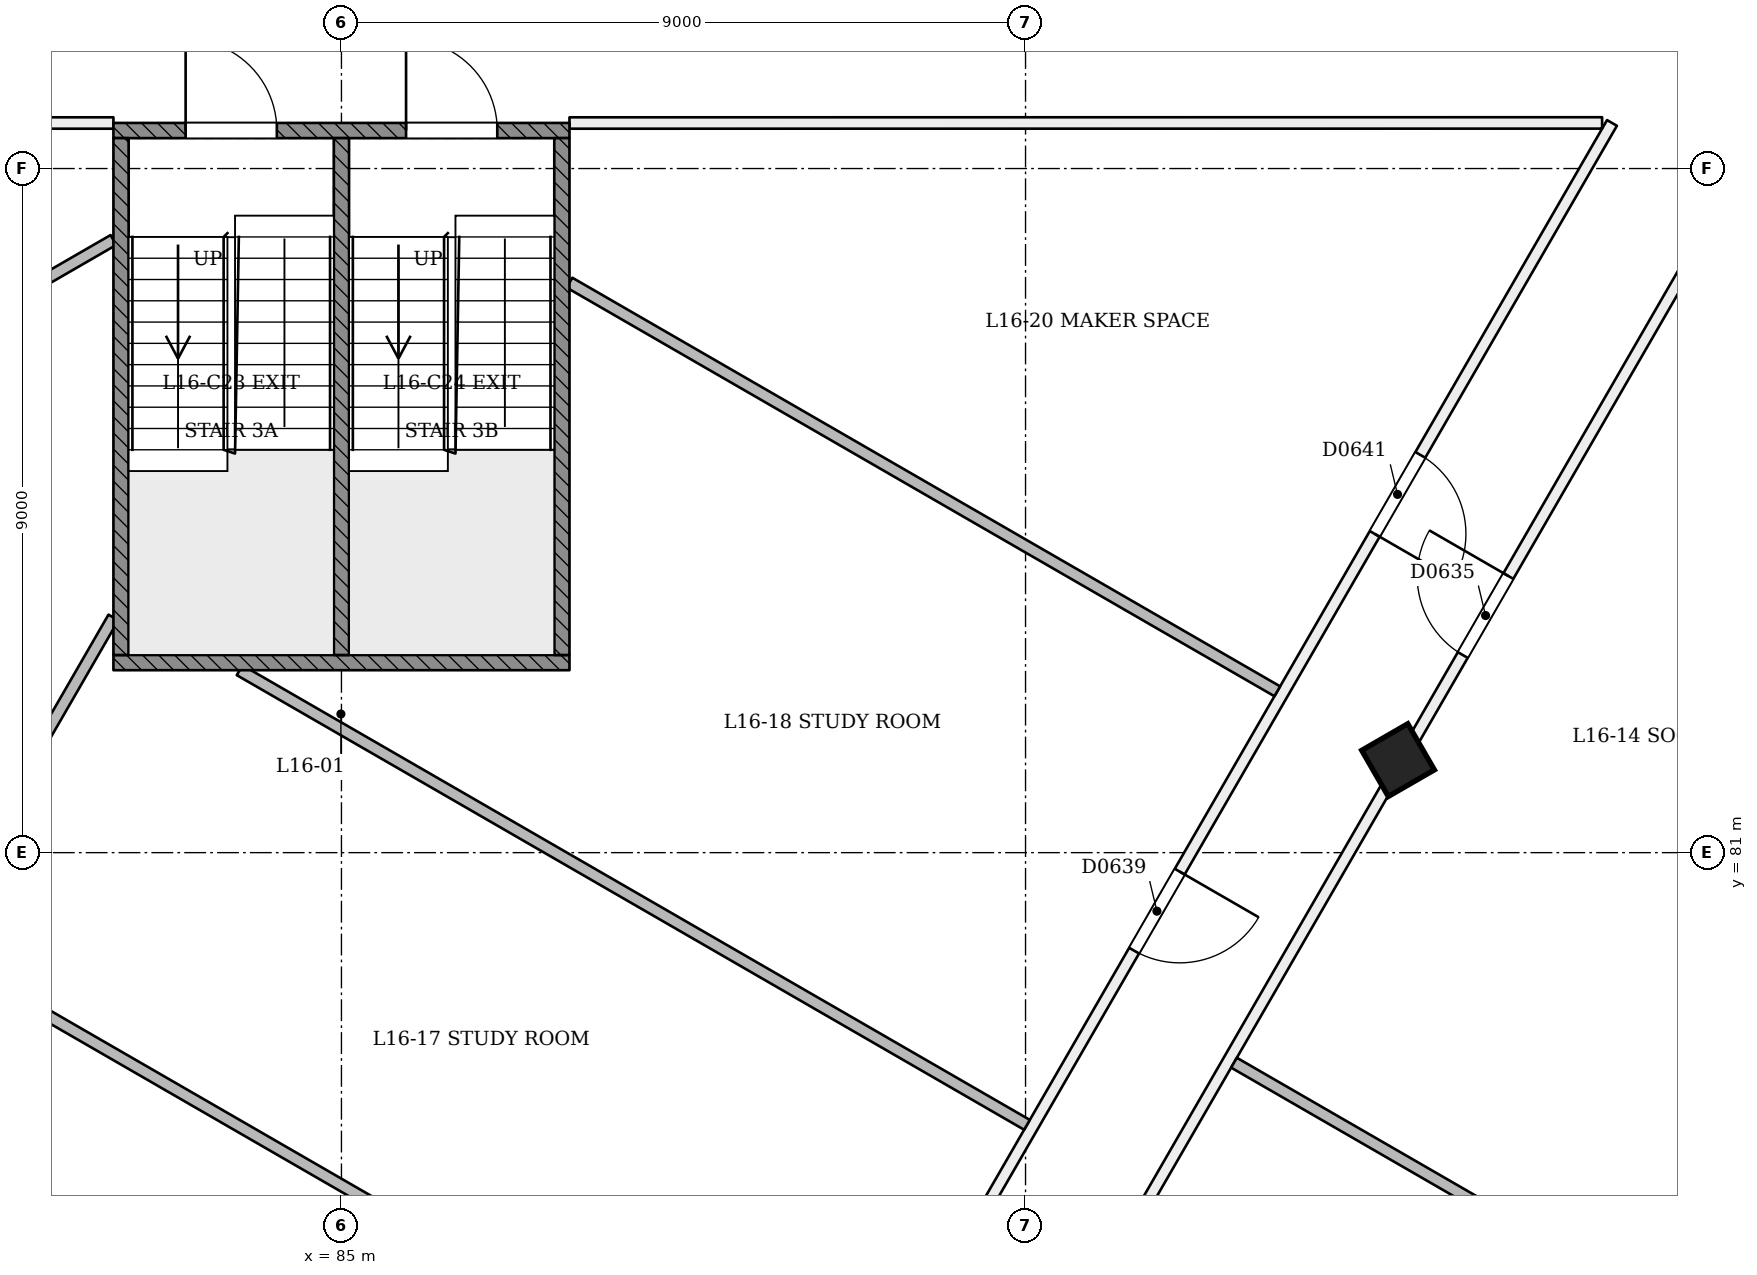
"""IFC4 building model, lengths in metres.
Left out: names, types, materials, properties, quantities, classifications, styles, units other than length and angle.
Written with IfcOpenShell. Run it as: python <this file> out.ifc"""

import sys

from ifc_helpers import new_model, si_unit, direction, frame, frame_2d, origin, origin_2d, place, context, subcontext, project, spatial, rectangle, extrude, element, fill, save


model = new_model("IFC4")
c1 = context("Model", 3, precision=1e-05, world=origin(), true_north=direction((0.0, 1.0)))
c2 = subcontext(c1, "Body", "Model", "MODEL_VIEW")
j1 = project(units=[si_unit("LENGTHUNIT", "METRE"), si_unit("PLANEANGLEUNIT", "RADIAN")], contexts=[c1])
p1 = place(None, origin())
s1 = spatial("IfcSite", under=j1, at=p1, CompositionType="ELEMENT")
p2 = place(p1, origin())
s2 = spatial("IfcBuilding", under=s1, at=p2, CompositionType="ELEMENT")
p3 = place(p2, frame((0.0, 0.0, 66.6)))
s3 = spatial("IfcBuildingStorey", under=s2, at=p3, CompositionType="ELEMENT", Elevation=66.6)
p4 = place(p3, frame((98.928, 82.17, -0.021), z_axis=(-0.022222910879, 0.038415824599, 0.999014697916), x_axis=(-0.499505628395, -0.866026390086, 0.022190513195)))
e1 = element("IfcColumn", 1, at=p4, inside=s3, PredefinedType="COLUMN", context=c2, shape_type="SweptSolid", body=[
    extrude(rectangle(XDim=0.7, YDim=0.7, at=origin_2d()), origin(), (0.0, 0.0, 1.0), 3.604),
])
p5 = place(p3, frame((62.458, 97.093, 0.0), z_axis=(0.0, 0.0, 1.0), x_axis=(0.499998802074, -0.866026095406, 0.0)))
e2 = element("IfcWall", 2, at=p5, inside=s3, PredefinedType="PARTITIONING", context=c2, shape_type="SweptSolid", body=[
    extrude(rectangle(XDim=43.437, YDim=0.15, at=frame_2d((21.719, 0.0))), origin(), (0.0, 0.0, 1.0), 2.7),
])
p6 = place(p5, frame((0.286, 0.0, 0.0)))
e3 = element("IfcOpeningElement", 3, at=p6, cuts=e2, PredefinedType="OPENING", context=c2, shape_type="SweptSolid", body=[
    extrude(rectangle(XDim=1.2, YDim=2.1, at=frame_2d((0.6, 1.05))), frame((0.0, 0.085, 0.0), z_axis=(0.0, -1.0, 0.0), x_axis=(1.0, 0.0, 0.0)), (0.0, 0.0, 1.0), 0.171),
])
p7 = place(p5, frame((12.13, 0.0, 0.0)))
e4 = element("IfcOpeningElement", 4, at=p7, cuts=e2, PredefinedType="OPENING", context=c2, shape_type="SweptSolid", body=[
    extrude(rectangle(XDim=1.2, YDim=2.1, at=frame_2d((0.6, 1.05))), frame((0.0, 0.085, 0.0), z_axis=(0.0, -1.0, 0.0), x_axis=(1.0, 0.0, 0.0)), (0.0, 0.0, 1.0), 0.171),
])
p8 = place(p5, frame((18.98, 0.0, 0.0)))
e5 = element("IfcOpeningElement", 5, at=p8, cuts=e2, PredefinedType="OPENING", context=c2, shape_type="SweptSolid", body=[
    extrude(rectangle(XDim=1.0, YDim=2.1, at=frame_2d((0.5, 1.05))), frame((0.0, 0.085, 0.0), z_axis=(0.0, -1.0, 0.0), x_axis=(1.0, 0.0, 0.0)), (0.0, 0.0, 1.0), 0.171),
])
p9 = place(p5, frame((27.88, 0.0, 0.0)))
e6 = element("IfcOpeningElement", 6, at=p9, cuts=e2, PredefinedType="OPENING", context=c2, shape_type="SweptSolid", body=[
    extrude(rectangle(XDim=1.2, YDim=2.1, at=frame_2d((0.6, 1.05))), frame((0.0, 0.085, 0.0), z_axis=(0.0, -1.0, 0.0), x_axis=(1.0, 0.0, 0.0)), (0.0, 0.0, 1.0), 0.171),
])
p10 = place(p5, frame((38.745, 0.0, 0.0)))
e7 = element("IfcOpeningElement", 7, at=p10, cuts=e2, PredefinedType="OPENING", context=c2, shape_type="SweptSolid", body=[
    extrude(rectangle(XDim=1.2, YDim=2.1, at=frame_2d((0.6, 1.05))), frame((0.0, 0.085, 0.0), z_axis=(0.0, -1.0, 0.0), x_axis=(1.0, 0.0, 0.0)), (0.0, 0.0, 1.0), 0.171),
])
p11 = place(p3, frame((85.824, 59.475, 0.0), z_axis=(0.0, 0.0, 1.0), x_axis=(0.499998498473, 0.86602627069, 0.0)))
e8 = element("IfcWall", 8, at=p11, inside=s3, PredefinedType="PARTITIONING", context=c2, shape_type="SweptSolid", body=[
    extrude(rectangle(XDim=42.924, YDim=0.15, at=frame_2d((21.462, 0.0))), origin(), (0.0, 0.0, 1.0), 2.7),
])
p12 = place(p11, frame((3.492, 0.0, 0.0)))
e9 = element("IfcOpeningElement", 9, at=p12, cuts=e8, PredefinedType="OPENING", context=c2, shape_type="SweptSolid", body=[
    extrude(rectangle(XDim=1.2, YDim=2.1, at=frame_2d((0.6, 1.05))), frame((0.0, 0.085, 0.0), z_axis=(0.0, -1.0, 0.0), x_axis=(1.0, 0.0, 0.0)), (0.0, 0.0, 1.0), 0.171),
])
p13 = place(p11, frame((14.357, 0.0, 0.0)))
e10 = element("IfcOpeningElement", 10, at=p13, cuts=e8, PredefinedType="OPENING", context=c2, shape_type="SweptSolid", body=[
    extrude(rectangle(XDim=1.2, YDim=2.1, at=frame_2d((0.6, 1.05))), frame((0.0, 0.085, 0.0), z_axis=(0.0, -1.0, 0.0), x_axis=(1.0, 0.0, 0.0)), (0.0, 0.0, 1.0), 0.171),
])
p14 = place(p11, frame((27.857, 0.0, 0.0)))
e11 = element("IfcOpeningElement", 11, at=p14, cuts=e8, PredefinedType="OPENING", context=c2, shape_type="SweptSolid", body=[
    extrude(rectangle(XDim=1.2, YDim=2.1, at=frame_2d((0.6, 1.05))), frame((0.0, 0.085, 0.0), z_axis=(0.0, -1.0, 0.0), x_axis=(1.0, 0.0, 0.0)), (0.0, 0.0, 1.0), 0.171),
])
p15 = place(p11, frame((38.721, 0.0, 0.0)))
e12 = element("IfcOpeningElement", 12, at=p15, cuts=e8, PredefinedType="OPENING", context=c2, shape_type="SweptSolid", body=[
    extrude(rectangle(XDim=1.2, YDim=2.1, at=frame_2d((0.6, 1.05))), frame((0.0, 0.085, 0.0), z_axis=(0.0, -1.0, 0.0), x_axis=(1.0, 0.0, 0.0)), (0.0, 0.0, 1.0), 0.171),
])
p16 = place(p3, frame((101.715, 90.6, 0.0), z_axis=(0.0, 0.0, 1.0), x_axis=(-0.499996397115, -0.866027483901, 0.0)))
e13 = element("IfcWall", 13, at=p16, inside=s3, PredefinedType="PARTITIONING", context=c2, shape_type="SweptSolid", body=[
    extrude(rectangle(XDim=33.301, YDim=0.15, at=frame_2d((16.65, 0.0))), origin(), (0.0, 0.0, 1.0), 3.1),
])
p17 = place(p16, frame((17.288, 0.0, 0.0)))
e14 = element("IfcOpeningElement", 14, at=p17, cuts=e13, PredefinedType="OPENING", context=c2, shape_type="SweptSolid", body=[
    extrude(rectangle(XDim=1.2, YDim=2.1, at=frame_2d((0.6, 1.05))), frame((0.0, 0.085, 0.0), z_axis=(0.0, -1.0, 0.0), x_axis=(1.0, 0.0, 0.0)), (0.0, 0.0, 1.0), 0.171),
])
p18 = place(p16, frame((11.374, 0.0, 0.0)))
e15 = element("IfcOpeningElement", 15, at=p18, cuts=e13, PredefinedType="OPENING", context=c2, shape_type="SweptSolid", body=[
    extrude(rectangle(XDim=1.2, YDim=2.1, at=frame_2d((0.6, 1.05))), frame((0.0, 0.085, 0.0), z_axis=(0.0, -1.0, 0.0), x_axis=(1.0, 0.0, 0.0)), (0.0, 0.0, 1.0), 0.171),
])
p19 = place(p16, frame((5.043, 0.0, 0.0)))
e16 = element("IfcOpeningElement", 16, at=p19, cuts=e13, PredefinedType="OPENING", context=c2, shape_type="SweptSolid", body=[
    extrude(rectangle(XDim=1.2, YDim=2.1, at=frame_2d((0.6, 1.05))), frame((0.0, 0.085, 0.0), z_axis=(0.0, -1.0, 0.0), x_axis=(1.0, 0.0, 0.0)), (0.0, 0.0, 1.0), 0.171),
])
p20 = place(p3, frame((85.0, 61.648, 0.0), z_axis=(0.0, 0.0, 1.0), x_axis=(-0.499995543135, 0.866027976941, 0.0)))
e17 = element("IfcWall", 17, at=p20, inside=s3, PredefinedType="PARTITIONING", context=c2, shape_type="SweptSolid", body=[
    extrude(rectangle(XDim=33.431, YDim=0.15, at=frame_2d((16.715, 0.0))), origin(), (0.0, 0.0, 1.0), 3.1),
])
p21 = place(p20, frame((5.719, 0.0, 0.0)))
e18 = element("IfcOpeningElement", 18, at=p21, cuts=e17, PredefinedType="OPENING", context=c2, shape_type="SweptSolid", body=[
    extrude(rectangle(XDim=1.2, YDim=2.1, at=frame_2d((0.6, 1.05))), frame((0.0, 0.085, 0.0), z_axis=(0.0, -1.0, 0.0), x_axis=(1.0, 0.0, 0.0)), (0.0, 0.0, 1.0), 0.171),
])
p22 = place(p20, frame((21.269, 0.0, 0.0)))
e19 = element("IfcOpeningElement", 19, at=p22, cuts=e17, PredefinedType="OPENING", context=c2, shape_type="SweptSolid", body=[
    extrude(rectangle(XDim=1.2, YDim=2.1, at=frame_2d((0.6, 1.05))), frame((0.0, 0.085, 0.0), z_axis=(0.0, -1.0, 0.0), x_axis=(1.0, 0.0, 0.0)), (0.0, 0.0, 1.0), 0.171),
])
p23 = place(p20, frame((27.454, 0.0, 0.0)))
e20 = element("IfcOpeningElement", 20, at=p23, cuts=e17, PredefinedType="OPENING", context=c2, shape_type="SweptSolid", body=[
    extrude(rectangle(XDim=1.2, YDim=2.1, at=frame_2d((0.6, 1.05))), frame((0.0, 0.085, 0.0), z_axis=(0.0, -1.0, 0.0), x_axis=(1.0, 0.0, 0.0)), (0.0, 0.0, 1.0), 0.171),
])
p24 = place(p20, frame((12.513, 0.0, 0.0)))
e21 = element("IfcOpeningElement", 21, at=p24, cuts=e17, PredefinedType="OPENING", context=c2, shape_type="SweptSolid", body=[
    extrude(rectangle(XDim=1.2, YDim=2.1, at=frame_2d((0.6, 1.05))), frame((0.0, 0.085, 0.0), z_axis=(0.0, -1.0, 0.0), x_axis=(1.0, 0.0, 0.0)), (0.0, 0.0, 1.0), 0.171),
])
for number, where, z_axis, x_axis in (
    (22, (88.0, 90.599, 0.0), (0.0, 0.0, 1.0), (1.0, 7.188e-05, 0.0)),
    (23, (68.415, 90.6, 0.0), (0.0, 0.0, 1.0), (1.0, -7.188e-05, 0.0)),
):
    element("IfcWall", number, at=place(p3, frame(where, z_axis=z_axis, x_axis=x_axis)), inside=s3, PredefinedType="PARTITIONING", context=c2, shape_type="SweptSolid", body=[
        extrude(rectangle(XDim=13.585, YDim=0.15, at=frame_2d((6.793, 0.0))), origin(), (0.0, 0.0, 1.0), 3.1),
    ])
p25 = place(p3, frame((102.22, 75.074, 0.0), z_axis=(0.0, 0.0, 1.0), x_axis=(-0.866015887322, 0.500016482634, 0.0)))
e24 = element("IfcWall", 24, at=p25, inside=s3, PredefinedType="PARTITIONING", context=c2, shape_type="SweptSolid", body=[
    extrude(rectangle(XDim=6.325, YDim=0.15, at=frame_2d((3.163, 0.0))), origin(), (0.0, 0.0, 1.0), 2.6),
])
p26 = place(p3, frame((94.019, 77.419, 0.0), z_axis=(0.0, 0.0, 1.0), x_axis=(-0.866025155626, 0.500000429823, 0.0)))
e25 = element("IfcWall", 25, at=p26, inside=s3, PredefinedType="PARTITIONING", context=c2, shape_type="SweptSolid", body=[
    extrude(rectangle(XDim=11.961, YDim=0.15, at=frame_2d((5.981, 0.0))), origin(), (0.0, 0.0, 1.0), 3.1),
])
p27 = place(p3, frame((82.0, 84.094, 0.0), z_axis=(0.0, 0.0, 1.0), x_axis=(-0.500007457698, -0.866021098038, 0.0)))
e26 = element("IfcWall", 26, at=p27, inside=s3, PredefinedType="PARTITIONING", context=c2, shape_type="SweptSolid", body=[
    extrude(rectangle(XDim=4.894, YDim=0.15, at=frame_2d((2.447, 0.0))), origin(), (0.0, 0.0, 1.0), 3.1),
])
p28 = place(p3, frame((79.515, 79.791, 0.0), z_axis=(0.0, 0.0, 1.0), x_axis=(0.866020625573, -0.500008276014, 0.0)))
e27 = element("IfcWall", 27, at=p28, inside=s3, PredefinedType="PARTITIONING", context=c2, shape_type="SweptSolid", body=[
    extrude(rectangle(XDim=7.295, YDim=0.15, at=frame_2d((3.648, 0.0))), origin(), (0.0, 0.0, 1.0), 3.1),
])
p29 = place(p3, frame((97.312, 83.123, 0.0), z_axis=(0.0, 0.0, 1.0), x_axis=(-0.866022617577, 0.500004825822, 0.0)))
e28 = element("IfcWall", 28, at=p29, inside=s3, PredefinedType="PARTITIONING", context=c2, shape_type="SweptSolid", body=[
    extrude(rectangle(XDim=10.752, YDim=0.15, at=frame_2d((5.376, 0.0))), origin(), (0.0, 0.0, 1.0), 3.1),
])
p30 = place(p3, frame((82.0, 89.06, 0.0), z_axis=(0.0, 0.0, 1.0), x_axis=(-0.866027129831, -0.499997010388, 0.0)))
e29 = element("IfcWall", 29, at=p30, inside=s3, PredefinedType="PARTITIONING", context=c2, shape_type="SweptSolid", body=[
    extrude(rectangle(XDim=11.033, YDim=0.15, at=frame_2d((5.516, 0.0))), origin(), (0.0, 0.0, 1.0), 3.1),
])
p31 = place(p3, frame((82.0, 90.5, 0.0), z_axis=(0.0, 0.0, 1.0), x_axis=(1.0, 0.0, 0.0)))
e30 = element("IfcWall", 30, at=p31, inside=s3, PredefinedType="SOLIDWALL", context=c2, shape_type="SweptSolid", body=[
    extrude(rectangle(XDim=6.0, YDim=0.2, at=frame_2d((3.0, 0.0))), origin(), (0.0, 0.0, 1.0), 3.1),
])
p32 = place(p31, frame((0.95, 0.0, 0.0)))
e31 = element("IfcOpeningElement", 31, at=p32, cuts=e30, PredefinedType="OPENING", context=c2, shape_type="SweptSolid", body=[
    extrude(rectangle(XDim=1.2, YDim=2.1, at=frame_2d((0.6, 1.05))), frame((0.0, 0.11, 0.0), z_axis=(0.0, -1.0, 0.0), x_axis=(1.0, 0.0, 0.0)), (0.0, 0.0, 1.0), 0.221),
])
p33 = place(p31, frame((3.85, 0.0, 0.0)))
e32 = element("IfcOpeningElement", 32, at=p33, cuts=e30, PredefinedType="OPENING", context=c2, shape_type="SweptSolid", body=[
    extrude(rectangle(XDim=1.2, YDim=2.1, at=frame_2d((0.6, 1.05))), frame((0.0, 0.11, 0.0), z_axis=(0.0, -1.0, 0.0), x_axis=(1.0, 0.0, 0.0)), (0.0, 0.0, 1.0), 0.221),
])
p34 = place(p3, frame((82.0, 83.5, 0.0), z_axis=(0.0, 0.0, 1.0), x_axis=(1.0, 0.0, 0.0)))
e33 = element("IfcWall", 33, at=p34, inside=s3, PredefinedType="SOLIDWALL", context=c2, shape_type="SweptSolid", body=[
    extrude(rectangle(XDim=6.0, YDim=0.2, at=frame_2d((3.0, 0.0))), origin(), (0.0, 0.0, 1.0), 3.1),
])
for number, where, z_axis, x_axis in (
    (34, (82.1, 83.6, 0.0), (0.0, 0.0, 1.0), (0.0, 1.0, 0.0)),
    (35, (87.9, 83.6, 0.0), (0.0, 0.0, 1.0), (0.0, 1.0, 0.0)),
    (36, (85.0, 83.6, 0.0), (0.0, 0.0, 1.0), (0.0, 1.0, 0.0)),
):
    element("IfcWall", number, at=place(p3, frame(where, z_axis=z_axis, x_axis=x_axis)), inside=s3, PredefinedType="SOLIDWALL", context=c2, shape_type="SweptSolid", body=[
        extrude(rectangle(XDim=6.8, YDim=0.2, at=frame_2d((3.4, 0.0))), origin(), (0.0, 0.0, 1.0), 3.1),
    ])
p35 = place(p14, origin())
e37 = element("IfcDoor", 37, at=p35, inside=s3, OperationType="SINGLE_SWING_RIGHT", PredefinedType="NOTDEFINED", context=c2, shape_type="SweptSolid", body=[
    extrude(rectangle(XDim=1.2, YDim=2.1, at=frame_2d((0.6, 1.05))), frame((0.0, 0.025, 0.0), z_axis=(0.0, -1.0, 0.0), x_axis=(1.0, 0.0, 0.0)), (0.0, 0.0, 1.0), 0.05),
])
fill(e11, e37)
p36 = place(p18, origin())
e38 = element("IfcDoor", 38, at=p36, inside=s3, OperationType="SINGLE_SWING_LEFT", PredefinedType="NOTDEFINED", context=c2, shape_type="SweptSolid", body=[
    extrude(rectangle(XDim=1.2, YDim=2.1, at=frame_2d((0.6, 1.05))), frame((0.0, 0.025, 0.0), z_axis=(0.0, -1.0, 0.0), x_axis=(1.0, 0.0, 0.0)), (0.0, 0.0, 1.0), 0.05),
])
fill(e15, e38)
p37 = place(p19, origin())
e39 = element("IfcDoor", 39, at=p37, inside=s3, OperationType="SINGLE_SWING_RIGHT", PredefinedType="NOTDEFINED", context=c2, shape_type="SweptSolid", body=[
    extrude(rectangle(XDim=1.2, YDim=2.1, at=frame_2d((0.6, 1.05))), frame((0.0, 0.025, 0.0), z_axis=(0.0, -1.0, 0.0), x_axis=(1.0, 0.0, 0.0)), (0.0, 0.0, 1.0), 0.05),
])
fill(e16, e39)
p38 = place(p32, origin())
e40 = element("IfcDoor", 40, at=p38, inside=s3, OperationType="SINGLE_SWING_LEFT", PredefinedType="NOTDEFINED", context=c2, shape_type="SweptSolid", body=[
    extrude(rectangle(XDim=1.2, YDim=2.1, at=frame_2d((0.6, 1.05))), frame((0.0, 0.025, 0.0), z_axis=(0.0, -1.0, 0.0), x_axis=(1.0, 0.0, 0.0)), (0.0, 0.0, 1.0), 0.05),
])
fill(e31, e40)
p39 = place(p33, origin())
e41 = element("IfcDoor", 41, at=p39, inside=s3, OperationType="SINGLE_SWING_LEFT", PredefinedType="NOTDEFINED", context=c2, shape_type="SweptSolid", body=[
    extrude(rectangle(XDim=1.2, YDim=2.1, at=frame_2d((0.6, 1.05))), frame((0.0, 0.025, 0.0), z_axis=(0.0, -1.0, 0.0), x_axis=(1.0, 0.0, 0.0)), (0.0, 0.0, 1.0), 0.05),
])
fill(e32, e41)
save(model, sys.argv[1])
